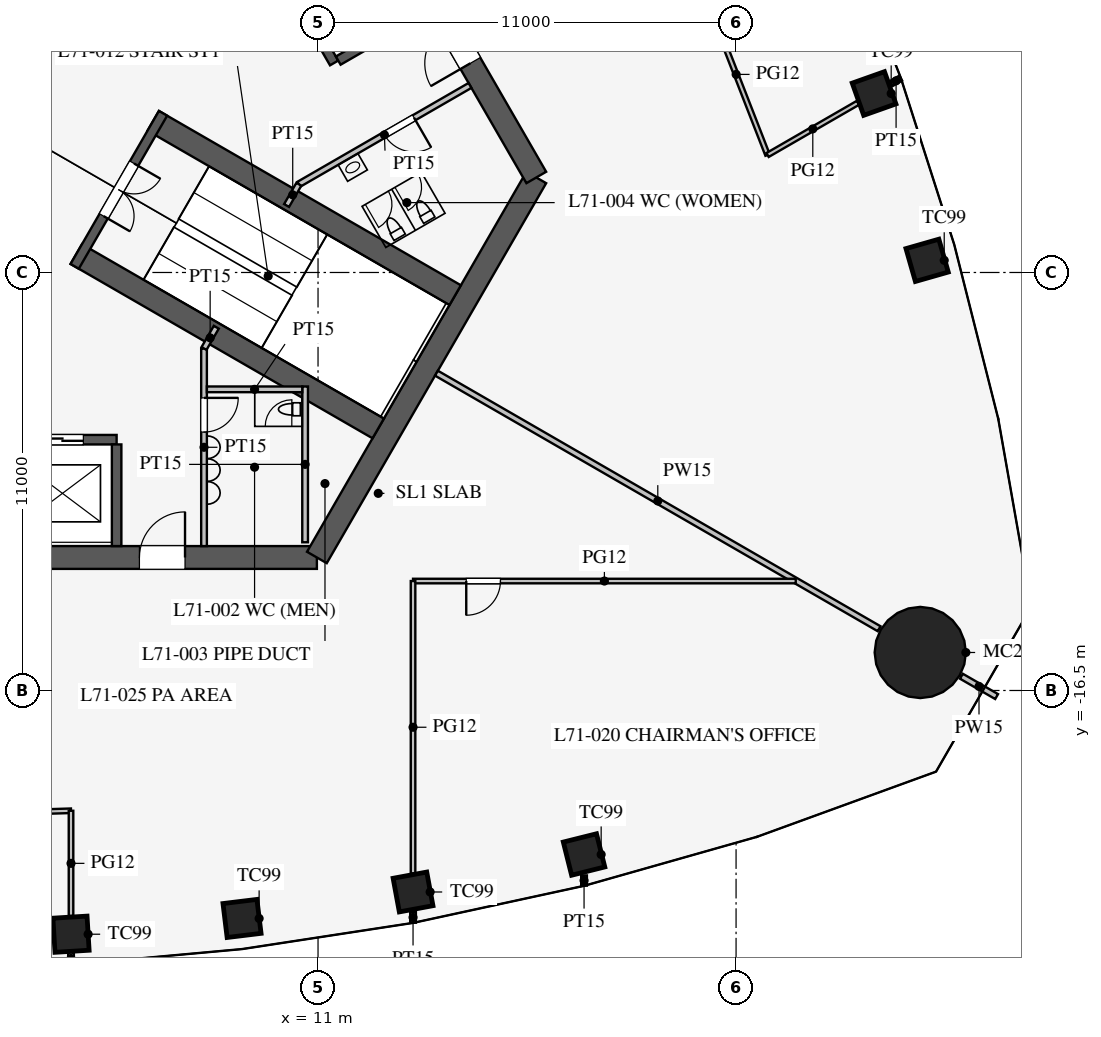
"""IFC4 building model, lengths in metres.
Left out: names, types, materials, properties, quantities, classifications, styles, units other than length and angle.
Written with IfcOpenShell. Run it as: python <this file> out.ifc"""

import sys

from ifc_helpers import new_model, si_unit, direction, frame, frame_2d, origin, origin_2d, place, context, subcontext, project, spatial, rectangle, circle, extrude, element, fill, save


model = new_model("IFC4")
c1 = context("Model", 3, precision=1e-05, world=origin(), true_north=direction((0.0, 1.0)))
c2 = subcontext(c1, "Body", "Model", "MODEL_VIEW")
j1 = project(units=[si_unit("LENGTHUNIT", "METRE"), si_unit("PLANEANGLEUNIT", "RADIAN")], contexts=[c1])
p1 = place(None, origin())
s1 = spatial("IfcSite", under=j1, at=p1, CompositionType="ELEMENT")
p2 = place(p1, origin())
s2 = spatial("IfcBuilding", under=s1, at=p2, CompositionType="ELEMENT")
p3 = place(p2, frame((0.0, 0.0, 309.9)))
s3 = spatial("IfcBuildingStorey", under=s2, at=p3, CompositionType="ELEMENT", Elevation=309.9)
for number, where, z_axis, x_axis in (
    (1, (4.5, -22.914, 0.0), (0.0, 0.0, 1.0), (0.998, 0.061, 0.0)),
    (2, (9.0, -22.499, 0.0), (0.0, 0.0, 1.0), (0.993, 0.121, 0.0)),
    (3, (13.5, -21.803, 0.0), (0.0, 0.0, 1.0), (0.983, 0.182, 0.0)),
    (4, (18.0, -20.816, 0.0), (0.0, 0.0, 1.0), (0.97, 0.242, 0.0)),
    (5, (27.027, -5.18, 0.0), (0.0, 0.0, 1.0), (-0.275, 0.961, 0.0)),
    (6, (25.632, -0.79, 0.0), (0.0, 0.0, 1.0), (-0.334, 0.942, 0.0)),
):
    element("IfcColumn", number, at=place(p3, frame(where, z_axis=z_axis, x_axis=x_axis)), inside=s3, PredefinedType="COLUMN", context=c2, shape_type="SweptSolid", body=[
        extrude(rectangle(XDim=0.9, YDim=0.9, at=origin_2d()), origin(), (0.0, 0.0, 1.0), 4.2),
    ])
p4 = place(p3, frame((26.847, -15.5, 0.0), z_axis=(0.0, 0.0, 1.0), x_axis=(1.0, 0.0, 0.0)))
e7 = element("IfcColumn", 7, at=p4, inside=s3, PredefinedType="COLUMN", context=c2, shape_type="SweptSolid", body=[
    extrude(circle(Radius=1.2, at=origin_2d()), origin(), (0.0, 0.0, 1.0), 4.2),
])
p5 = place(p3, frame((-10.97, -13.0, 0.0), z_axis=(0.0, 0.0, 1.0), x_axis=(1.0, 0.0, 0.0)))
e8 = element("IfcWall", 8, at=p5, inside=s3, PredefinedType="SHEAR", context=c2, shape_type="SweptSolid", body=[
    extrude(rectangle(XDim=21.939, YDim=0.6, at=frame_2d((10.97, 0.0))), origin(), (0.0, 0.0, 1.0), 4.2),
])
p6 = place(p5, frame((17.27, 0.0, 0.0)))
e9 = element("IfcOpeningElement", 9, at=p6, cuts=e8, PredefinedType="OPENING", context=c2, shape_type="SweptSolid", body=[
    extrude(rectangle(XDim=1.2, YDim=2.1, at=frame_2d((0.6, 1.05))), frame((0.0, 0.31, 0.0), z_axis=(0.0, -1.0, 0.0), x_axis=(1.0, 0.0, 0.0)), (0.0, 0.0, 1.0), 0.62),
])
p7 = place(p5, frame((3.47, 0.0, 0.0)))
e10 = element("IfcOpeningElement", 10, at=p7, cuts=e8, PredefinedType="OPENING", context=c2, shape_type="SweptSolid", body=[
    extrude(rectangle(XDim=1.2, YDim=2.1, at=frame_2d((0.6, 1.05))), frame((0.0, 0.31, 0.0), z_axis=(0.0, -1.0, 0.0), x_axis=(1.0, 0.0, 0.0)), (0.0, 0.0, 1.0), 0.62),
])
p8 = place(p3, frame((10.97, -13.0, 0.0), z_axis=(0.0, 0.0, 1.0), x_axis=(0.499995765644, 0.866027848477, 0.0)))
e11 = element("IfcWall", 11, at=p8, inside=s3, PredefinedType="SHEAR", context=c2, shape_type="SweptSolid", body=[
    extrude(rectangle(XDim=11.547, YDim=0.6, at=frame_2d((5.773, 0.0))), origin(), (0.0, 0.0, 1.0), 4.2),
])
p9 = place(p3, frame((16.743, -3.0, 0.0), z_axis=(0.0, 0.0, 1.0), x_axis=(-0.500002442456, 0.866023993627, 0.0)))
e12 = element("IfcWall", 12, at=p9, inside=s3, PredefinedType="SHEAR", context=c2, shape_type="SweptSolid", body=[
    extrude(rectangle(XDim=21.939, YDim=0.6, at=frame_2d((10.97, 0.0))), origin(), (0.0, 0.0, 1.0), 4.2),
])
p10 = place(p9, frame((17.27, 0.0, 0.0)))
e13 = element("IfcOpeningElement", 13, at=p10, cuts=e12, PredefinedType="OPENING", context=c2, shape_type="SweptSolid", body=[
    extrude(rectangle(XDim=1.2, YDim=2.1, at=frame_2d((0.6, 1.05))), frame((0.0, 0.31, 0.0), z_axis=(0.0, -1.0, 0.0), x_axis=(1.0, 0.0, 0.0)), (0.0, 0.0, 1.0), 0.62),
])
p11 = place(p9, frame((3.47, 0.0, 0.0)))
e14 = element("IfcOpeningElement", 14, at=p11, cuts=e12, PredefinedType="OPENING", context=c2, shape_type="SweptSolid", body=[
    extrude(rectangle(XDim=1.2, YDim=2.1, at=frame_2d((0.6, 1.05))), frame((0.0, 0.31, 0.0), z_axis=(0.0, -1.0, 0.0), x_axis=(1.0, 0.0, 0.0)), (0.0, 0.0, 1.0), 0.62),
])
p12 = place(p3, frame((-5.7, -9.9, 0.0), z_axis=(0.0, 0.0, 1.0), x_axis=(1.0, 0.0, 0.0)))
e15 = element("IfcWall", 15, at=p12, inside=s3, PredefinedType="SHEAR", context=c2, shape_type="SweptSolid", body=[
    extrude(rectangle(XDim=11.4, YDim=0.25, at=frame_2d((5.7, 0.0))), origin(), (0.0, 0.0, 1.0), 4.2),
])
p13 = place(p12, frame((0.875, 0.0, 0.0)))
e16 = element("IfcOpeningElement", 16, at=p13, cuts=e15, PredefinedType="OPENING", context=c2, shape_type="SweptSolid", body=[
    extrude(rectangle(XDim=1.1, YDim=2.2, at=frame_2d((0.55, 1.1))), frame((0.0, 0.135, 0.0), z_axis=(0.0, -1.0, 0.0), x_axis=(1.0, 0.0, 0.0)), (0.0, 0.0, 1.0), 0.27),
])
p14 = place(p12, frame((3.725, 0.0, 0.0)))
e17 = element("IfcOpeningElement", 17, at=p14, cuts=e15, PredefinedType="OPENING", context=c2, shape_type="SweptSolid", body=[
    extrude(rectangle(XDim=1.1, YDim=2.2, at=frame_2d((0.55, 1.1))), frame((0.0, 0.135, 0.0), z_axis=(0.0, -1.0, 0.0), x_axis=(1.0, 0.0, 0.0)), (0.0, 0.0, 1.0), 0.27),
])
p15 = place(p12, frame((6.575, 0.0, 0.0)))
e18 = element("IfcOpeningElement", 18, at=p15, cuts=e15, PredefinedType="OPENING", context=c2, shape_type="SweptSolid", body=[
    extrude(rectangle(XDim=1.1, YDim=2.2, at=frame_2d((0.55, 1.1))), frame((0.0, 0.135, 0.0), z_axis=(0.0, -1.0, 0.0), x_axis=(1.0, 0.0, 0.0)), (0.0, 0.0, 1.0), 0.27),
])
p16 = place(p12, frame((9.425, 0.0, 0.0)))
e19 = element("IfcOpeningElement", 19, at=p16, cuts=e15, PredefinedType="OPENING", context=c2, shape_type="SweptSolid", body=[
    extrude(rectangle(XDim=1.1, YDim=2.2, at=frame_2d((0.55, 1.1))), frame((0.0, 0.135, 0.0), z_axis=(0.0, -1.0, 0.0), x_axis=(1.0, 0.0, 0.0)), (0.0, 0.0, 1.0), 0.27),
])
p17 = place(p3, frame((5.7, -10.025, 0.0), z_axis=(0.0, 0.0, 1.0), x_axis=(0.0, -1.0, 0.0)))
e20 = element("IfcWall", 20, at=p17, inside=s3, PredefinedType="SHEAR", context=c2, shape_type="SweptSolid", body=[
    extrude(rectangle(XDim=2.675, YDim=0.25, at=frame_2d((1.337, 0.0))), origin(), (0.0, 0.0, 1.0), 4.2),
])
p18 = place(p3, frame((11.424, 0.014, 0.0), z_axis=(0.0, 0.0, 1.0), x_axis=(-0.500001763848, 0.866024385424, 0.0)))
e21 = element("IfcWall", 21, at=p18, inside=s3, PredefinedType="SHEAR", context=c2, shape_type="SweptSolid", body=[
    extrude(rectangle(XDim=11.4, YDim=0.25, at=frame_2d((5.7, 0.0))), origin(), (0.0, 0.0, 1.0), 4.2),
])
p19 = place(p18, frame((0.975, 0.0, 0.0)))
e22 = element("IfcOpeningElement", 22, at=p19, cuts=e21, PredefinedType="OPENING", context=c2, shape_type="SweptSolid", body=[
    extrude(rectangle(XDim=0.9, YDim=2.1, at=frame_2d((0.45, 1.05))), frame((0.0, 0.135, 0.0), z_axis=(0.0, -1.0, 0.0), x_axis=(1.0, 0.0, 0.0)), (0.0, 0.0, 1.0), 0.27),
])
p20 = place(p18, frame((3.825, 0.0, 0.0)))
e23 = element("IfcOpeningElement", 23, at=p20, cuts=e21, PredefinedType="OPENING", context=c2, shape_type="SweptSolid", body=[
    extrude(rectangle(XDim=0.9, YDim=2.1, at=frame_2d((0.45, 1.05))), frame((0.0, 0.135, 0.0), z_axis=(0.0, -1.0, 0.0), x_axis=(1.0, 0.0, 0.0)), (0.0, 0.0, 1.0), 0.27),
])
p21 = place(p18, frame((6.675, 0.0, 0.0)))
e24 = element("IfcOpeningElement", 24, at=p21, cuts=e21, PredefinedType="OPENING", context=c2, shape_type="SweptSolid", body=[
    extrude(rectangle(XDim=0.9, YDim=2.1, at=frame_2d((0.45, 1.05))), frame((0.0, 0.135, 0.0), z_axis=(0.0, -1.0, 0.0), x_axis=(1.0, 0.0, 0.0)), (0.0, 0.0, 1.0), 0.27),
])
p22 = place(p18, frame((9.525, 0.0, 0.0)))
e25 = element("IfcOpeningElement", 25, at=p22, cuts=e21, PredefinedType="OPENING", context=c2, shape_type="SweptSolid", body=[
    extrude(rectangle(XDim=0.9, YDim=2.1, at=frame_2d((0.45, 1.05))), frame((0.0, 0.135, 0.0), z_axis=(0.0, -1.0, 0.0), x_axis=(1.0, 0.0, 0.0)), (0.0, 0.0, 1.0), 0.27),
])
p23 = place(p3, frame((11.532, 0.076, 0.0), z_axis=(0.0, 0.0, 1.0), x_axis=(0.86604424267, 0.499967368674, 0.0)))
e26 = element("IfcWall", 26, at=p23, inside=s3, PredefinedType="SHEAR", context=c2, shape_type="SweptSolid", body=[
    extrude(rectangle(XDim=2.675, YDim=0.25, at=frame_2d((1.337, 0.0))), origin(), (0.0, 0.0, 1.0), 4.2),
])
p24 = place(p3, frame((4.638, -5.016, 0.0), z_axis=(0.0, 0.0, 1.0), x_axis=(0.866012320003, -0.50002266109, 0.0)))
e27 = element("IfcWall", 27, at=p24, inside=s3, PredefinedType="SHEAR", context=c2, shape_type="SweptSolid", body=[
    extrude(rectangle(XDim=9.175, YDim=0.6, at=frame_2d((4.587, 0.0))), origin(), (0.0, 0.0, 1.0), 4.2),
])
p25 = place(p3, frame((6.663, -1.509, 0.0), z_axis=(0.0, 0.0, 1.0), x_axis=(0.86603049496, -0.499991181721, 0.0)))
e28 = element("IfcWall", 28, at=p25, inside=s3, PredefinedType="SHEAR", context=c2, shape_type="SweptSolid", body=[
    extrude(rectangle(XDim=9.175, YDim=0.6, at=frame_2d((4.587, 0.0))), origin(), (0.0, 0.0, 1.0), 4.2),
])
p26 = place(p3, frame((4.597, -5.339, 0.0), z_axis=(0.0, 0.0, 1.0), x_axis=(0.499984536904, 0.866034331223, 0.0)))
e29 = element("IfcWall", 29, at=p26, inside=s3, PredefinedType="SHEAR", context=c2, shape_type="SweptSolid", body=[
    extrude(rectangle(XDim=4.65, YDim=0.25, at=frame_2d((2.325, 0.0))), origin(), (0.0, 0.0, 1.0), 4.2),
])
p27 = place(p26, frame((1.525, 0.0, 0.0)))
e30 = element("IfcOpeningElement", 30, at=p27, cuts=e29, PredefinedType="OPENING", context=c2, shape_type="SweptSolid", body=[
    extrude(rectangle(XDim=1.6, YDim=2.1, at=frame_2d((0.8, 1.05))), frame((0.0, 0.135, 0.0), z_axis=(0.0, -1.0, 0.0), x_axis=(1.0, 0.0, 0.0)), (0.0, 0.0, 1.0), 0.27),
])
p28 = place(p3, frame((8.0, -7.5, 0.0), z_axis=(0.0, 0.0, 1.0), x_axis=(0.0, -1.0, 0.0)))
e31 = element("IfcWall", 31, at=p28, inside=s3, PredefinedType="PARTITIONING", context=c2, shape_type="SweptSolid", body=[
    extrude(rectangle(XDim=5.2, YDim=0.15, at=frame_2d((2.6, 0.0))), origin(), (0.0, 0.0, 1.0), 4.0),
])
p29 = place(p28, frame((1.3, 0.0, 0.0)))
e32 = element("IfcOpeningElement", 32, at=p29, cuts=e31, PredefinedType="OPENING", context=c2, shape_type="SweptSolid", body=[
    extrude(rectangle(XDim=0.9, YDim=2.1, at=frame_2d((0.45, 1.05))), frame((0.0, 0.085, 0.0), z_axis=(0.0, -1.0, 0.0), x_axis=(1.0, 0.0, 0.0)), (0.0, 0.0, 1.0), 0.17),
])
p30 = place(p3, frame((10.495, -3.178, 0.0), z_axis=(0.0, 0.0, 1.0), x_axis=(0.866021400173, 0.500006934395, 0.0)))
e33 = element("IfcWall", 33, at=p30, inside=s3, PredefinedType="PARTITIONING", context=c2, shape_type="SweptSolid", body=[
    extrude(rectangle(XDim=5.2, YDim=0.15, at=frame_2d((2.6, 0.0))), origin(), (0.0, 0.0, 1.0), 4.0),
])
p31 = place(p30, frame((2.6, 0.0, 0.0)))
e34 = element("IfcOpeningElement", 34, at=p31, cuts=e33, PredefinedType="OPENING", context=c2, shape_type="SweptSolid", body=[
    extrude(rectangle(XDim=0.9, YDim=2.1, at=frame_2d((0.45, 1.05))), frame((0.0, 0.085, 0.0), z_axis=(0.0, -1.0, 0.0), x_axis=(1.0, 0.0, 0.0)), (0.0, 0.0, 1.0), 0.17),
])
for number, where, z_axis, x_axis in (
    (35, (8.0, -7.5, 0.0), (0.0, 0.0, 1.0), (0.5, 0.866, 0.0)),
    (36, (10.495, -3.178, 0.0), (0.0, 0.0, 1.0), (-0.5, -0.866, 0.0)),
):
    element("IfcWall", number, at=place(p3, frame(where, z_axis=z_axis, x_axis=x_axis)), inside=s3, PredefinedType="PARTITIONING", context=c2, shape_type="SweptSolid", body=[
        extrude(rectangle(XDim=0.645, YDim=0.15, at=frame_2d((0.323, 0.0))), origin(), (0.0, 0.0, 1.0), 4.0),
    ])
p32 = place(p3, frame((10.66, -8.5, 0.0), z_axis=(0.0, 0.0, 1.0), x_axis=(0.0, -1.0, 0.0)))
e37 = element("IfcWall", 37, at=p32, inside=s3, PredefinedType="PARTITIONING", context=c2, shape_type="SweptSolid", body=[
    extrude(rectangle(XDim=4.1, YDim=0.15, at=frame_2d((2.05, 0.0))), origin(), (0.0, 0.0, 1.0), 4.0),
])
p33 = place(p3, frame((8.075, -8.575, 0.0), z_axis=(0.0, 0.0, 1.0), x_axis=(1.0, 0.0, 0.0)))
e38 = element("IfcWall", 38, at=p33, inside=s3, PredefinedType="PARTITIONING", context=c2, shape_type="SweptSolid", body=[
    extrude(rectangle(XDim=2.51, YDim=0.15, at=frame_2d((1.255, 0.0))), origin(), (0.0, 0.0, 1.0), 4.0),
])
p34 = place(p3, frame((14.116, -8.15, 0.0), z_axis=(0.0, 0.0, 1.0), x_axis=(0.866020541135, -0.500008422262, 0.0)))
e39 = element("IfcWall", 39, at=p34, inside=s3, PredefinedType="PARTITIONING", context=c2, shape_type="SweptSolid", body=[
    extrude(rectangle(XDim=13.45, YDim=0.15, at=frame_2d((6.725, 0.0))), origin(), (0.0, 0.0, 1.0), 2.5),
])
p35 = place(p3, frame((27.929, -16.125, 0.0), z_axis=(0.0, 0.0, 1.0), x_axis=(0.866086810508, -0.499893625349, 0.0)))
e40 = element("IfcWall", 40, at=p35, inside=s3, PredefinedType="PARTITIONING", context=c2, shape_type="SweptSolid", body=[
    extrude(rectangle(XDim=1.07, YDim=0.15, at=frame_2d((0.535, 0.0))), origin(), (0.0, 0.0, 1.0), 2.5),
])
p36 = place(p3, frame((13.5, -13.62, 0.0), z_axis=(0.0, 0.0, 1.0), x_axis=(1.0, 0.0, 0.0)))
e41 = element("IfcWall", 41, at=p36, inside=s3, PredefinedType="PARTITIONING", context=c2, shape_type="SweptSolid", body=[
    extrude(rectangle(XDim=10.07, YDim=0.12, at=frame_2d((5.035, 0.0))), origin(), (0.0, 0.0, 1.0), 2.9),
])
p37 = place(p36, frame((1.4, 0.0, 0.15)))
e42 = element("IfcOpeningElement", 42, at=p37, cuts=e41, PredefinedType="OPENING", context=c2, shape_type="SweptSolid", body=[
    extrude(rectangle(XDim=0.9, YDim=2.1, at=frame_2d((0.45, 1.05))), frame((0.0, 0.07, 0.0), z_axis=(0.0, -1.0, 0.0), x_axis=(1.0, 0.0, 0.0)), (0.0, 0.0, 1.0), 0.14),
])
p38 = place(p3, frame((13.5, -22.331, 0.0), z_axis=(0.0, 0.0, 1.0), x_axis=(0.0, -1.0, 0.0)))
e43 = element("IfcWall", 43, at=p38, inside=s3, PredefinedType="PARTITIONING", context=c2, shape_type="SweptSolid", body=[
    extrude(rectangle(XDim=0.28, YDim=0.15, at=frame_2d((0.14, 0.0))), origin(), (0.0, 0.0, 1.0), 2.9),
])
p39 = place(p3, frame((18.0, -21.366, 0.0), z_axis=(0.0, 0.0, 1.0), x_axis=(0.0, -1.0, 0.0)))
e44 = element("IfcWall", 44, at=p39, inside=s3, PredefinedType="PARTITIONING", context=c2, shape_type="SweptSolid", body=[
    extrude(rectangle(XDim=0.27, YDim=0.15, at=frame_2d((0.135, 0.0))), origin(), (0.0, 0.0, 1.0), 2.9),
])
p40 = place(p3, frame((4.5, -23.394, 0.0), z_axis=(0.0, 0.0, 1.0), x_axis=(0.0, -1.0, 0.0)))
e45 = element("IfcWall", 45, at=p40, inside=s3, PredefinedType="PARTITIONING", context=c2, shape_type="SweptSolid", body=[
    extrude(rectangle(XDim=0.316, YDim=0.15, at=frame_2d((0.158, 0.0))), origin(), (0.0, 0.0, 1.0), 2.9),
])
p41 = place(p3, frame((0.0, -19.802, 0.0), z_axis=(0.0, 0.0, 1.0), x_axis=(0.999542074227, 0.030259574513, 0.0)))
e46 = element("IfcWall", 46, at=p41, inside=s3, PredefinedType="PARTITIONING", context=c2, shape_type="SweptSolid", body=[
    extrude(rectangle(XDim=4.502, YDim=0.12, at=frame_2d((2.251, 0.0))), origin(), (0.0, 0.0, 1.0), 2.9),
])
p42 = place(p41, frame((1.8, 0.0, 0.15)))
e47 = element("IfcOpeningElement", 47, at=p42, cuts=e46, PredefinedType="OPENING", context=c2, shape_type="SweptSolid", body=[
    extrude(rectangle(XDim=0.9, YDim=2.1, at=frame_2d((0.45, 1.05))), frame((0.0, 0.07, 0.0), z_axis=(0.0, -1.0, 0.0), x_axis=(1.0, 0.0, 0.0)), (0.0, 0.0, 1.0), 0.14),
])
p43 = place(p3, frame((13.5, -13.62, 0.0), z_axis=(0.0, 0.0, 1.0), x_axis=(0.0, -1.0, 0.0)))
e48 = element("IfcWall", 48, at=p43, inside=s3, PredefinedType="PARTITIONING", context=c2, shape_type="SweptSolid", body=[
    extrude(rectangle(XDim=7.695, YDim=0.12, at=frame_2d((3.847, 0.0))), origin(), (0.0, 0.0, 1.0), 2.9),
])
p44 = place(p3, frame((4.5, -19.665, 0.0), z_axis=(0.0, 0.0, 1.0), x_axis=(0.0, -1.0, 0.0)))
e49 = element("IfcWall", 49, at=p44, inside=s3, PredefinedType="PARTITIONING", context=c2, shape_type="SweptSolid", body=[
    extrude(rectangle(XDim=2.768, YDim=0.12, at=frame_2d((1.384, 0.0))), origin(), (0.0, 0.0, 1.0), 2.9),
])
p45 = place(p3, frame((26.089, -0.526, 0.0), z_axis=(0.0, 0.0, 1.0), x_axis=(0.865982457891, 0.500074377092, 0.0)))
e50 = element("IfcWall", 50, at=p45, inside=s3, PredefinedType="PARTITIONING", context=c2, shape_type="SweptSolid", body=[
    extrude(rectangle(XDim=0.28, YDim=0.15, at=frame_2d((0.14, 0.0))), origin(), (0.0, 0.0, 1.0), 2.9),
])
p46 = place(p3, frame((22.829, -2.408, 0.0), z_axis=(0.0, 0.0, 1.0), x_axis=(-0.363230297573, 0.931699388711, 0.0)))
e51 = element("IfcWall", 51, at=p46, inside=s3, PredefinedType="PARTITIONING", context=c2, shape_type="SweptSolid", body=[
    extrude(rectangle(XDim=4.552, YDim=0.12, at=frame_2d((2.276, 0.0))), origin(), (0.0, 0.0, 1.0), 2.9),
])
p47 = place(p3, frame((22.829, -2.408, 0.0), z_axis=(0.0, 0.0, 1.0), x_axis=(0.866031754707, 0.499988999718, 0.0)))
e52 = element("IfcWall", 52, at=p47, inside=s3, PredefinedType="PARTITIONING", context=c2, shape_type="SweptSolid", body=[
    extrude(rectangle(XDim=2.749, YDim=0.12, at=frame_2d((1.374, 0.0))), origin(), (0.0, 0.0, 1.0), 2.9),
])
p48 = place(p29, origin())
e53 = element("IfcDoor", 53, at=p48, inside=s3, OperationType="SINGLE_SWING_LEFT", PredefinedType="DOOR", context=c2, shape_type="SweptSolid", body=[
    extrude(rectangle(XDim=0.9, YDim=2.1, at=frame_2d((0.45, 1.05))), frame((0.0, 0.025, 0.0), z_axis=(0.0, -1.0, 0.0), x_axis=(1.0, 0.0, 0.0)), (0.0, 0.0, 1.0), 0.05),
])
fill(e32, e53)
p49 = place(p31, frame((0.9, 0.0, 0.0), z_axis=(0.0, 0.0, 1.0), x_axis=(-1.0, 0.0, 0.0)))
e54 = element("IfcDoor", 54, at=p49, inside=s3, OperationType="SINGLE_SWING_LEFT", PredefinedType="DOOR", context=c2, shape_type="SweptSolid", body=[
    extrude(rectangle(XDim=0.9, YDim=2.1, at=frame_2d((0.45, 1.05))), frame((0.0, 0.025, 0.0), z_axis=(0.0, -1.0, 0.0), x_axis=(1.0, 0.0, 0.0)), (0.0, 0.0, 1.0), 0.05),
])
fill(e34, e54)
p50 = place(p27, frame((1.6, 0.0, 0.0), z_axis=(0.0, 0.0, 1.0), x_axis=(-1.0, 0.0, 0.0)))
e55 = element("IfcDoor", 55, at=p50, inside=s3, OperationType="DOUBLE_DOOR_SINGLE_SWING", PredefinedType="DOOR", context=c2, shape_type="SweptSolid", body=[
    extrude(rectangle(XDim=1.6, YDim=2.1, at=frame_2d((0.8, 1.05))), frame((0.0, 0.025, 0.0), z_axis=(0.0, -1.0, 0.0), x_axis=(1.0, 0.0, 0.0)), (0.0, 0.0, 1.0), 0.05),
])
fill(e30, e55)
p51 = place(p6, origin())
e56 = element("IfcDoor", 56, at=p51, inside=s3, OperationType="SINGLE_SWING_RIGHT", PredefinedType="DOOR", context=c2, shape_type="SweptSolid", body=[
    extrude(rectangle(XDim=1.2, YDim=2.1, at=frame_2d((0.6, 1.05))), frame((0.0, 0.025, 0.0), z_axis=(0.0, -1.0, 0.0), x_axis=(1.0, 0.0, 0.0)), (0.0, 0.0, 1.0), 0.05),
])
fill(e9, e56)
p52 = place(p11, origin())
e57 = element("IfcDoor", 57, at=p52, inside=s3, OperationType="SINGLE_SWING_LEFT", PredefinedType="DOOR", context=c2, shape_type="SweptSolid", body=[
    extrude(rectangle(XDim=1.2, YDim=2.1, at=frame_2d((0.6, 1.05))), frame((0.0, 0.025, 0.0), z_axis=(0.0, -1.0, 0.0), x_axis=(1.0, 0.0, 0.0)), (0.0, 0.0, 1.0), 0.05),
])
fill(e14, e57)
p53 = place(p37, frame((0.9, 0.0, 0.0), z_axis=(0.0, 0.0, 1.0), x_axis=(-1.0, 0.0, 0.0)))
e58 = element("IfcDoor", 58, at=p53, inside=s3, OperationType="SINGLE_SWING_RIGHT", PredefinedType="DOOR", context=c2, shape_type="SweptSolid", body=[
    extrude(rectangle(XDim=0.9, YDim=2.1, at=frame_2d((0.45, 1.05))), frame((0.0, 0.025, 0.0), z_axis=(0.0, -1.0, 0.0), x_axis=(1.0, 0.0, 0.0)), (0.0, 0.0, 1.0), 0.05),
])
fill(e42, e58)
p54 = place(p16, origin())
e59 = element("IfcDoor", 59, at=p54, inside=s3, OperationType="DOUBLE_DOOR_SLIDING", PredefinedType="DOOR", context=c2, shape_type="SweptSolid", body=[
    extrude(rectangle(XDim=1.1, YDim=2.2, at=frame_2d((0.55, 1.1))), frame((0.0, 0.025, 0.0), z_axis=(0.0, -1.0, 0.0), x_axis=(1.0, 0.0, 0.0)), (0.0, 0.0, 1.0), 0.05),
])
fill(e19, e59)
save(model, sys.argv[1])
